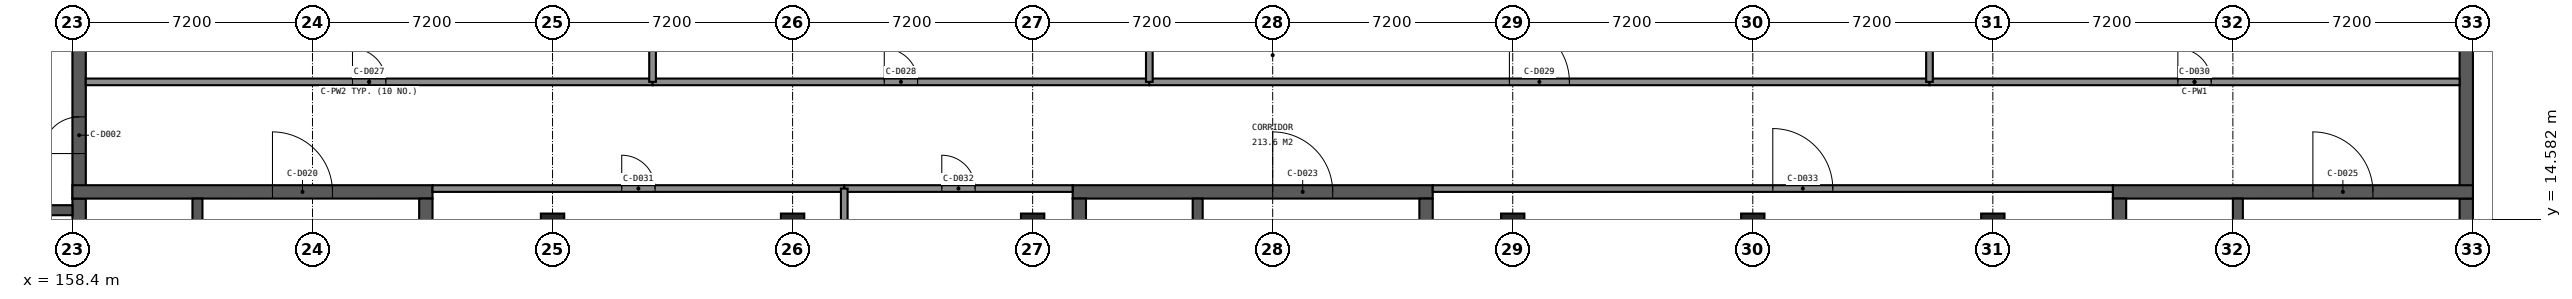
"""IFC4 building model, lengths in metres.
Left out: names, types, materials, properties, quantities, classifications, styles, units other than length and angle.
Written with IfcOpenShell. Run it as: python <this file> out.ifc"""

import sys

from ifc_helpers import new_model, si_unit, direction, frame, frame_2d, origin, origin_2d, place, context, subcontext, project, spatial, rectangle, extrude, element, fill, save


model = new_model("IFC4")
c1 = context("Model", 3, precision=1e-05, world=origin(), true_north=direction((0.0, 1.0)))
c2 = subcontext(c1, "Body", "Model", "MODEL_VIEW")
j1 = project(units=[si_unit("LENGTHUNIT", "METRE"), si_unit("PLANEANGLEUNIT", "RADIAN")], contexts=[c1])
p1 = place(None, origin())
s1 = spatial("IfcSite", under=j1, at=p1, CompositionType="ELEMENT")
p2 = place(p1, origin())
s2 = spatial("IfcBuilding", under=s1, at=p2, CompositionType="ELEMENT")
p3 = place(p2, origin())
s3 = spatial("IfcBuildingStorey", under=s2, at=p3, CompositionType="ELEMENT", Elevation=0.0)
for number, where, z_axis, x_axis in (
    (1, (172.8, 14.4, -0.3), (0.0, 0.0, 1.0), (1.0, 0.0, 0.0)),
    (2, (180.0, 14.4, -0.3), (0.0, 0.0, 1.0), (1.0, 0.0, 0.0)),
    (3, (187.2, 14.4, -0.3), (0.0, 0.0, 1.0), (1.0, 0.0, 0.0)),
    (4, (201.6, 14.4, -0.3), (0.0, 0.0, 1.0), (1.0, 0.0, 0.0)),
    (5, (208.8, 14.4, -0.3), (0.0, 0.0, 1.0), (1.0, 0.0, 0.0)),
    (6, (216.0, 14.4, -0.3), (0.0, 0.0, 1.0), (1.0, 0.0, 0.0)),
):
    element("IfcColumn", number, at=place(p3, frame(where, z_axis=z_axis, x_axis=x_axis)), inside=s3, PredefinedType="COLUMN", context=c2, shape_type="SweptSolid", body=[
        extrude(rectangle(XDim=0.7, YDim=0.7, at=origin_2d()), origin(), (0.0, 0.0, 1.0), 5.1),
    ])
p4 = place(p3, frame((158.6, 15.2, -0.3), z_axis=(0.0, 0.0, 1.0), x_axis=(0.0, 1.0, 0.0)))
e7 = element("IfcWall", 7, at=p4, inside=s3, PredefinedType="SHEAR", context=c2, shape_type="SweptSolid", body=[
    extrude(rectangle(XDim=6.05, YDim=0.4, at=frame_2d((3.025, 0.0))), origin(), (0.0, 0.0, 1.0), 4.25),
])
p5 = place(p4, frame((1.35, 0.0, 0.3)))
e8 = element("IfcOpeningElement", 8, at=p5, cuts=e7, PredefinedType="OPENING", context=c2, shape_type="SweptSolid", body=[
    extrude(rectangle(XDim=1.1, YDim=2.1, at=frame_2d((0.55, 1.05))), frame((0.0, 0.21, 0.0), z_axis=(0.0, -1.0, 0.0), x_axis=(1.0, 0.0, 0.0)), (0.0, 0.0, 1.0), 0.42),
])
p6 = place(p3, frame((158.6, 7.6, -0.3), z_axis=(0.0, 0.0, 1.0), x_axis=(0.0, 1.0, 0.0)))
e9 = element("IfcWall", 9, at=p6, inside=s3, PredefinedType="SHEAR", context=c2, shape_type="SweptSolid", body=[
    extrude(rectangle(XDim=7.6, YDim=0.4, at=frame_2d((3.8, 0.0))), origin(), (0.0, 0.0, 1.0), 4.85),
])
p7 = place(p3, frame((230.2, 21.25, -0.3), z_axis=(0.0, 0.0, 1.0), x_axis=(0.0, -1.0, 0.0)))
e10 = element("IfcWall", 10, at=p7, inside=s3, PredefinedType="SHEAR", context=c2, shape_type="SweptSolid", body=[
    extrude(rectangle(XDim=6.05, YDim=0.4, at=frame_2d((3.025, 0.0))), origin(), (0.0, 0.0, 1.0), 4.25),
])
p8 = place(p3, frame((230.2, 15.2, -0.3), z_axis=(0.0, 0.0, 1.0), x_axis=(0.0, -1.0, 0.0)))
e11 = element("IfcWall", 11, at=p8, inside=s3, PredefinedType="SHEAR", context=c2, shape_type="SweptSolid", body=[
    extrude(rectangle(XDim=7.6, YDim=0.4, at=frame_2d((3.8, 0.0))), origin(), (0.0, 0.0, 1.0), 4.85),
])
p9 = place(p3, frame((158.4, 15.4, 0.0), z_axis=(0.0, 0.0, 1.0), x_axis=(1.0, 0.0, 0.0)))
e12 = element("IfcWall", 12, at=p9, inside=s3, PredefinedType="SHEAR", context=c2, shape_type="SweptSolid", body=[
    extrude(rectangle(XDim=10.8, YDim=0.4, at=frame_2d((5.4, 0.0))), origin(), (0.0, 0.0, 1.0), 4.55),
])
p10 = place(p9, frame((6.0, 0.0, 0.0)))
e13 = element("IfcOpeningElement", 13, at=p10, cuts=e12, PredefinedType="OPENING", context=c2, shape_type="SweptSolid", body=[
    extrude(rectangle(XDim=1.8, YDim=2.1, at=frame_2d((0.9, 1.05))), frame((0.0, 0.21, 0.0), z_axis=(0.0, -1.0, 0.0), x_axis=(1.0, 0.0, 0.0)), (0.0, 0.0, 1.0), 0.42),
])
p11 = place(p3, frame((169.0, 15.2, 0.0), z_axis=(0.0, 0.0, 1.0), x_axis=(0.0, -1.0, 0.0)))
e14 = element("IfcWall", 14, at=p11, inside=s3, PredefinedType="SHEAR", context=c2, shape_type="SweptSolid", body=[
    extrude(rectangle(XDim=7.6, YDim=0.4, at=frame_2d((3.8, 0.0))), origin(), (0.0, 0.0, 1.0), 4.55),
])
p12 = place(p3, frame((162.15, 15.2, 0.0), z_axis=(0.0, 0.0, 1.0), x_axis=(0.0, -1.0, 0.0)))
e15 = element("IfcWall", 15, at=p12, inside=s3, PredefinedType="SHEAR", context=c2, shape_type="SweptSolid", body=[
    extrude(rectangle(XDim=7.6, YDim=0.3, at=frame_2d((3.8, 0.0))), origin(), (0.0, 0.0, 1.0), 4.55),
])
p13 = place(p12, frame((6.35, 0.0, 0.0)))
e16 = element("IfcOpeningElement", 16, at=p13, cuts=e15, PredefinedType="OPENING", context=c2, shape_type="SweptSolid", body=[
    extrude(rectangle(XDim=1.0, YDim=2.1, at=frame_2d((0.5, 1.05))), frame((0.0, 0.16, 0.0), z_axis=(0.0, -1.0, 0.0), x_axis=(1.0, 0.0, 0.0)), (0.0, 0.0, 1.0), 0.32),
])
p14 = place(p3, frame((188.4, 15.4, 0.0), z_axis=(0.0, 0.0, 1.0), x_axis=(1.0, 0.0, 0.0)))
e17 = element("IfcWall", 17, at=p14, inside=s3, PredefinedType="SHEAR", context=c2, shape_type="SweptSolid", body=[
    extrude(rectangle(XDim=10.8, YDim=0.4, at=frame_2d((5.4, 0.0))), origin(), (0.0, 0.0, 1.0), 4.55),
])
p15 = place(p14, frame((6.0, 0.0, 0.0)))
e18 = element("IfcOpeningElement", 18, at=p15, cuts=e17, PredefinedType="OPENING", context=c2, shape_type="SweptSolid", body=[
    extrude(rectangle(XDim=1.8, YDim=2.1, at=frame_2d((0.9, 1.05))), frame((0.0, 0.21, 0.0), z_axis=(0.0, -1.0, 0.0), x_axis=(1.0, 0.0, 0.0)), (0.0, 0.0, 1.0), 0.42),
])
for number, where, z_axis, x_axis in (
    (19, (188.6, 15.2, 0.0), (0.0, 0.0, 1.0), (0.0, -1.0, 0.0)),
    (20, (199.0, 15.2, 0.0), (0.0, 0.0, 1.0), (0.0, -1.0, 0.0)),
):
    element("IfcWall", number, at=place(p3, frame(where, z_axis=z_axis, x_axis=x_axis)), inside=s3, PredefinedType="SHEAR", context=c2, shape_type="SweptSolid", body=[
        extrude(rectangle(XDim=7.6, YDim=0.4, at=frame_2d((3.8, 0.0))), origin(), (0.0, 0.0, 1.0), 4.55),
    ])
p16 = place(p3, frame((192.15, 15.2, 0.0), z_axis=(0.0, 0.0, 1.0), x_axis=(0.0, -1.0, 0.0)))
e21 = element("IfcWall", 21, at=p16, inside=s3, PredefinedType="SHEAR", context=c2, shape_type="SweptSolid", body=[
    extrude(rectangle(XDim=7.6, YDim=0.3, at=frame_2d((3.8, 0.0))), origin(), (0.0, 0.0, 1.0), 4.55),
])
p17 = place(p16, frame((6.35, 0.0, 0.0)))
e22 = element("IfcOpeningElement", 22, at=p17, cuts=e21, PredefinedType="OPENING", context=c2, shape_type="SweptSolid", body=[
    extrude(rectangle(XDim=1.0, YDim=2.1, at=frame_2d((0.5, 1.05))), frame((0.0, 0.16, 0.0), z_axis=(0.0, -1.0, 0.0), x_axis=(1.0, 0.0, 0.0)), (0.0, 0.0, 1.0), 0.32),
])
p18 = place(p3, frame((219.6, 15.4, 0.0), z_axis=(0.0, 0.0, 1.0), x_axis=(1.0, 0.0, 0.0)))
e23 = element("IfcWall", 23, at=p18, inside=s3, PredefinedType="SHEAR", context=c2, shape_type="SweptSolid", body=[
    extrude(rectangle(XDim=10.8, YDim=0.4, at=frame_2d((5.4, 0.0))), origin(), (0.0, 0.0, 1.0), 4.55),
])
p19 = place(p18, frame((6.0, 0.0, 0.0)))
e24 = element("IfcOpeningElement", 24, at=p19, cuts=e23, PredefinedType="OPENING", context=c2, shape_type="SweptSolid", body=[
    extrude(rectangle(XDim=1.8, YDim=2.1, at=frame_2d((0.9, 1.05))), frame((0.0, 0.21, 0.0), z_axis=(0.0, -1.0, 0.0), x_axis=(1.0, 0.0, 0.0)), (0.0, 0.0, 1.0), 0.42),
])
p20 = place(p3, frame((219.8, 15.2, 0.0), z_axis=(0.0, 0.0, 1.0), x_axis=(0.0, -1.0, 0.0)))
e25 = element("IfcWall", 25, at=p20, inside=s3, PredefinedType="SHEAR", context=c2, shape_type="SweptSolid", body=[
    extrude(rectangle(XDim=7.6, YDim=0.4, at=frame_2d((3.8, 0.0))), origin(), (0.0, 0.0, 1.0), 4.55),
])
p21 = place(p3, frame((223.35, 15.2, 0.0), z_axis=(0.0, 0.0, 1.0), x_axis=(0.0, -1.0, 0.0)))
e26 = element("IfcWall", 26, at=p21, inside=s3, PredefinedType="SHEAR", context=c2, shape_type="SweptSolid", body=[
    extrude(rectangle(XDim=7.6, YDim=0.3, at=frame_2d((3.8, 0.0))), origin(), (0.0, 0.0, 1.0), 4.55),
])
p22 = place(p21, frame((6.35, 0.0, 0.0)))
e27 = element("IfcOpeningElement", 27, at=p22, cuts=e26, PredefinedType="OPENING", context=c2, shape_type="SweptSolid", body=[
    extrude(rectangle(XDim=1.0, YDim=2.1, at=frame_2d((0.5, 1.05))), frame((0.0, 0.16, 0.0), z_axis=(0.0, -1.0, 0.0), x_axis=(1.0, 0.0, 0.0)), (0.0, 0.0, 1.0), 0.32),
])
p23 = place(p3, frame((158.4, 14.85, -0.25), z_axis=(0.0, 0.0, 1.0), x_axis=(-1.0, 0.0, 0.0)))
e28 = element("IfcWall", 28, at=p23, inside=s3, PredefinedType="SOLIDWALL", context=c2, shape_type="SweptSolid", body=[
    extrude(rectangle(XDim=7.2, YDim=0.3, at=frame_2d((3.6, 0.0))), origin(), (0.0, 0.0, 1.0), 5.05),
])
p24 = place(p3, frame((158.8, 18.7, 0.0), z_axis=(0.0, 0.0, 1.0), x_axis=(1.0, 0.0, 0.0)))
e29 = element("IfcWall", 29, at=p24, inside=s3, PredefinedType="PARTITIONING", context=c2, shape_type="SweptSolid", body=[
    extrude(rectangle(XDim=17.0, YDim=0.2, at=frame_2d((8.5, 0.0))), origin(), (0.0, 0.0, 1.0), 3.95),
])
p25 = place(p24, frame((8.0, 0.0, 0.0)))
e30 = element("IfcOpeningElement", 30, at=p25, cuts=e29, PredefinedType="OPENING", context=c2, shape_type="SweptSolid", body=[
    extrude(rectangle(XDim=1.0, YDim=2.1, at=frame_2d((0.5, 1.05))), frame((0.0, 0.11, 0.0), z_axis=(0.0, -1.0, 0.0), x_axis=(1.0, 0.0, 0.0)), (0.0, 0.0, 1.0), 0.22),
])
p26 = place(p3, frame((175.8, 18.7, 0.0), z_axis=(0.0, 0.0, 1.0), x_axis=(1.0, 0.0, 0.0)))
e31 = element("IfcWall", 31, at=p26, inside=s3, PredefinedType="PARTITIONING", context=c2, shape_type="SweptSolid", body=[
    extrude(rectangle(XDim=14.9, YDim=0.2, at=frame_2d((7.45, 0.0))), origin(), (0.0, 0.0, 1.0), 3.95),
])
p27 = place(p26, frame((6.95, 0.0, 0.0)))
e32 = element("IfcOpeningElement", 32, at=p27, cuts=e31, PredefinedType="OPENING", context=c2, shape_type="SweptSolid", body=[
    extrude(rectangle(XDim=1.0, YDim=2.1, at=frame_2d((0.5, 1.05))), frame((0.0, 0.11, 0.0), z_axis=(0.0, -1.0, 0.0), x_axis=(1.0, 0.0, 0.0)), (0.0, 0.0, 1.0), 0.22),
])
p28 = place(p3, frame((190.7, 18.7, 0.0), z_axis=(0.0, 0.0, 1.0), x_axis=(1.0, 0.0, 0.0)))
e33 = element("IfcWall", 33, at=p28, inside=s3, PredefinedType="PARTITIONING", context=c2, shape_type="SweptSolid", body=[
    extrude(rectangle(XDim=23.4, YDim=0.2, at=frame_2d((11.7, 0.0))), origin(), (0.0, 0.0, 1.0), 3.95),
])
p29 = place(p28, frame((10.8, 0.0, 0.0)))
e34 = element("IfcOpeningElement", 34, at=p29, cuts=e33, PredefinedType="OPENING", context=c2, shape_type="SweptSolid", body=[
    extrude(rectangle(XDim=1.8, YDim=2.1, at=frame_2d((0.9, 1.05))), frame((0.0, 0.11, 0.0), z_axis=(0.0, -1.0, 0.0), x_axis=(1.0, 0.0, 0.0)), (0.0, 0.0, 1.0), 0.22),
])
p30 = place(p3, frame((214.1, 18.7, 0.0), z_axis=(0.0, 0.0, 1.0), x_axis=(1.0, 0.0, 0.0)))
e35 = element("IfcWall", 35, at=p30, inside=s3, PredefinedType="PARTITIONING", context=c2, shape_type="SweptSolid", body=[
    extrude(rectangle(XDim=15.9, YDim=0.2, at=frame_2d((7.95, 0.0))), origin(), (0.0, 0.0, 1.0), 3.95),
])
p31 = place(p30, frame((7.45, 0.0, 0.0)))
e36 = element("IfcOpeningElement", 36, at=p31, cuts=e35, PredefinedType="OPENING", context=c2, shape_type="SweptSolid", body=[
    extrude(rectangle(XDim=1.0, YDim=2.1, at=frame_2d((0.5, 1.05))), frame((0.0, 0.11, 0.0), z_axis=(0.0, -1.0, 0.0), x_axis=(1.0, 0.0, 0.0)), (0.0, 0.0, 1.0), 0.22),
])
p32 = place(p3, frame((169.2, 15.5, 0.0), z_axis=(0.0, 0.0, 1.0), x_axis=(1.0, 0.0, 0.0)))
e37 = element("IfcWall", 37, at=p32, inside=s3, PredefinedType="PARTITIONING", context=c2, shape_type="SweptSolid", body=[
    extrude(rectangle(XDim=12.35, YDim=0.2, at=frame_2d((6.175, 0.0))), origin(), (0.0, 0.0, 1.0), 3.95),
])
p33 = place(p32, frame((5.675, 0.0, 0.0)))
e38 = element("IfcOpeningElement", 38, at=p33, cuts=e37, PredefinedType="OPENING", context=c2, shape_type="SweptSolid", body=[
    extrude(rectangle(XDim=1.0, YDim=2.1, at=frame_2d((0.5, 1.05))), frame((0.0, 0.11, 0.0), z_axis=(0.0, -1.0, 0.0), x_axis=(1.0, 0.0, 0.0)), (0.0, 0.0, 1.0), 0.22),
])
p34 = place(p3, frame((181.55, 15.5, 0.0), z_axis=(0.0, 0.0, 1.0), x_axis=(1.0, 0.0, 0.0)))
e39 = element("IfcWall", 39, at=p34, inside=s3, PredefinedType="PARTITIONING", context=c2, shape_type="SweptSolid", body=[
    extrude(rectangle(XDim=6.85, YDim=0.2, at=frame_2d((3.425, 0.0))), origin(), (0.0, 0.0, 1.0), 3.95),
])
p35 = place(p34, frame((2.925, 0.0, 0.0)))
e40 = element("IfcOpeningElement", 40, at=p35, cuts=e39, PredefinedType="OPENING", context=c2, shape_type="SweptSolid", body=[
    extrude(rectangle(XDim=1.0, YDim=2.1, at=frame_2d((0.5, 1.05))), frame((0.0, 0.11, 0.0), z_axis=(0.0, -1.0, 0.0), x_axis=(1.0, 0.0, 0.0)), (0.0, 0.0, 1.0), 0.22),
])
p36 = place(p3, frame((199.2, 15.5, 0.0), z_axis=(0.0, 0.0, 1.0), x_axis=(1.0, 0.0, 0.0)))
e41 = element("IfcWall", 41, at=p36, inside=s3, PredefinedType="PARTITIONING", context=c2, shape_type="SweptSolid", body=[
    extrude(rectangle(XDim=20.4, YDim=0.2, at=frame_2d((10.2, 0.0))), origin(), (0.0, 0.0, 1.0), 3.95),
])
p37 = place(p36, frame((10.2, 0.0, 0.0)))
e42 = element("IfcOpeningElement", 42, at=p37, cuts=e41, PredefinedType="OPENING", context=c2, shape_type="SweptSolid", body=[
    extrude(rectangle(XDim=1.8, YDim=2.1, at=frame_2d((0.9, 1.05))), frame((0.0, 0.11, 0.0), z_axis=(0.0, -1.0, 0.0), x_axis=(1.0, 0.0, 0.0)), (0.0, 0.0, 1.0), 0.22),
])
p38 = place(p3, frame((175.8, 28.4, 0.0), z_axis=(0.0, 0.0, 1.0), x_axis=(0.0, -1.0, 0.0)))
e43 = element("IfcWall", 43, at=p38, inside=s3, PredefinedType="PARTITIONING", context=c2, shape_type="SweptSolid", body=[
    extrude(rectangle(XDim=9.7, YDim=0.2, at=frame_2d((4.85, 0.0))), origin(), (0.0, 0.0, 1.0), 3.95),
])
p39 = place(p3, frame((181.55, 15.5, 0.0), z_axis=(0.0, 0.0, 1.0), x_axis=(0.0, -1.0, 0.0)))
e44 = element("IfcWall", 44, at=p39, inside=s3, PredefinedType="PARTITIONING", context=c2, shape_type="SweptSolid", body=[
    extrude(rectangle(XDim=7.9, YDim=0.2, at=frame_2d((3.95, 0.0))), origin(), (0.0, 0.0, 1.0), 3.95),
])
for number, where, z_axis, x_axis in (
    (45, (190.7, 28.4, 0.0), (0.0, 0.0, 1.0), (0.0, -1.0, 0.0)),
    (46, (214.1, 28.4, 0.0), (0.0, 0.0, 1.0), (0.0, -1.0, 0.0)),
):
    element("IfcWall", number, at=place(p3, frame(where, z_axis=z_axis, x_axis=x_axis)), inside=s3, PredefinedType="PARTITIONING", context=c2, shape_type="SweptSolid", body=[
        extrude(rectangle(XDim=9.7, YDim=0.2, at=frame_2d((4.85, 0.0))), origin(), (0.0, 0.0, 1.0), 3.95),
    ])
p40 = place(p5, origin())
e47 = element("IfcDoor", 47, at=p40, inside=s3, OperationType="NOTDEFINED", PredefinedType="DOOR", context=c2, shape_type="SweptSolid", body=[
    extrude(rectangle(XDim=1.1, YDim=2.1, at=frame_2d((0.55, 1.05))), frame((0.0, 0.025, 0.0), z_axis=(0.0, -1.0, 0.0), x_axis=(1.0, 0.0, 0.0)), (0.0, 0.0, 1.0), 0.05),
])
fill(e8, e47)
p41 = place(p10, origin())
e48 = element("IfcDoor", 48, at=p41, inside=s3, OperationType="NOTDEFINED", PredefinedType="DOOR", context=c2, shape_type="SweptSolid", body=[
    extrude(rectangle(XDim=1.8, YDim=2.1, at=frame_2d((0.9, 1.05))), frame((0.0, 0.025, 0.0), z_axis=(0.0, -1.0, 0.0), x_axis=(1.0, 0.0, 0.0)), (0.0, 0.0, 1.0), 0.05),
])
fill(e13, e48)
p42 = place(p15, origin())
e49 = element("IfcDoor", 49, at=p42, inside=s3, OperationType="NOTDEFINED", PredefinedType="DOOR", context=c2, shape_type="SweptSolid", body=[
    extrude(rectangle(XDim=1.8, YDim=2.1, at=frame_2d((0.9, 1.05))), frame((0.0, 0.025, 0.0), z_axis=(0.0, -1.0, 0.0), x_axis=(1.0, 0.0, 0.0)), (0.0, 0.0, 1.0), 0.05),
])
fill(e18, e49)
p43 = place(p19, origin())
e50 = element("IfcDoor", 50, at=p43, inside=s3, OperationType="NOTDEFINED", PredefinedType="DOOR", context=c2, shape_type="SweptSolid", body=[
    extrude(rectangle(XDim=1.8, YDim=2.1, at=frame_2d((0.9, 1.05))), frame((0.0, 0.025, 0.0), z_axis=(0.0, -1.0, 0.0), x_axis=(1.0, 0.0, 0.0)), (0.0, 0.0, 1.0), 0.05),
])
fill(e24, e50)
p44 = place(p25, origin())
e51 = element("IfcDoor", 51, at=p44, inside=s3, OperationType="NOTDEFINED", PredefinedType="DOOR", context=c2, shape_type="SweptSolid", body=[
    extrude(rectangle(XDim=1.0, YDim=2.1, at=frame_2d((0.5, 1.05))), frame((0.0, 0.025, 0.0), z_axis=(0.0, -1.0, 0.0), x_axis=(1.0, 0.0, 0.0)), (0.0, 0.0, 1.0), 0.05),
])
fill(e30, e51)
p45 = place(p27, origin())
e52 = element("IfcDoor", 52, at=p45, inside=s3, OperationType="NOTDEFINED", PredefinedType="DOOR", context=c2, shape_type="SweptSolid", body=[
    extrude(rectangle(XDim=1.0, YDim=2.1, at=frame_2d((0.5, 1.05))), frame((0.0, 0.025, 0.0), z_axis=(0.0, -1.0, 0.0), x_axis=(1.0, 0.0, 0.0)), (0.0, 0.0, 1.0), 0.05),
])
fill(e32, e52)
p46 = place(p29, origin())
e53 = element("IfcDoor", 53, at=p46, inside=s3, OperationType="NOTDEFINED", PredefinedType="DOOR", context=c2, shape_type="SweptSolid", body=[
    extrude(rectangle(XDim=1.8, YDim=2.1, at=frame_2d((0.9, 1.05))), frame((0.0, 0.025, 0.0), z_axis=(0.0, -1.0, 0.0), x_axis=(1.0, 0.0, 0.0)), (0.0, 0.0, 1.0), 0.05),
])
fill(e34, e53)
p47 = place(p31, origin())
e54 = element("IfcDoor", 54, at=p47, inside=s3, OperationType="NOTDEFINED", PredefinedType="DOOR", context=c2, shape_type="SweptSolid", body=[
    extrude(rectangle(XDim=1.0, YDim=2.1, at=frame_2d((0.5, 1.05))), frame((0.0, 0.025, 0.0), z_axis=(0.0, -1.0, 0.0), x_axis=(1.0, 0.0, 0.0)), (0.0, 0.0, 1.0), 0.05),
])
fill(e36, e54)
p48 = place(p33, origin())
e55 = element("IfcDoor", 55, at=p48, inside=s3, OperationType="NOTDEFINED", PredefinedType="DOOR", context=c2, shape_type="SweptSolid", body=[
    extrude(rectangle(XDim=1.0, YDim=2.1, at=frame_2d((0.5, 1.05))), frame((0.0, 0.025, 0.0), z_axis=(0.0, -1.0, 0.0), x_axis=(1.0, 0.0, 0.0)), (0.0, 0.0, 1.0), 0.05),
])
fill(e38, e55)
p49 = place(p35, origin())
e56 = element("IfcDoor", 56, at=p49, inside=s3, OperationType="NOTDEFINED", PredefinedType="DOOR", context=c2, shape_type="SweptSolid", body=[
    extrude(rectangle(XDim=1.0, YDim=2.1, at=frame_2d((0.5, 1.05))), frame((0.0, 0.025, 0.0), z_axis=(0.0, -1.0, 0.0), x_axis=(1.0, 0.0, 0.0)), (0.0, 0.0, 1.0), 0.05),
])
fill(e40, e56)
p50 = place(p37, origin())
e57 = element("IfcDoor", 57, at=p50, inside=s3, OperationType="NOTDEFINED", PredefinedType="DOOR", context=c2, shape_type="SweptSolid", body=[
    extrude(rectangle(XDim=1.8, YDim=2.1, at=frame_2d((0.9, 1.05))), frame((0.0, 0.025, 0.0), z_axis=(0.0, -1.0, 0.0), x_axis=(1.0, 0.0, 0.0)), (0.0, 0.0, 1.0), 0.05),
])
fill(e42, e57)
save(model, sys.argv[1])
